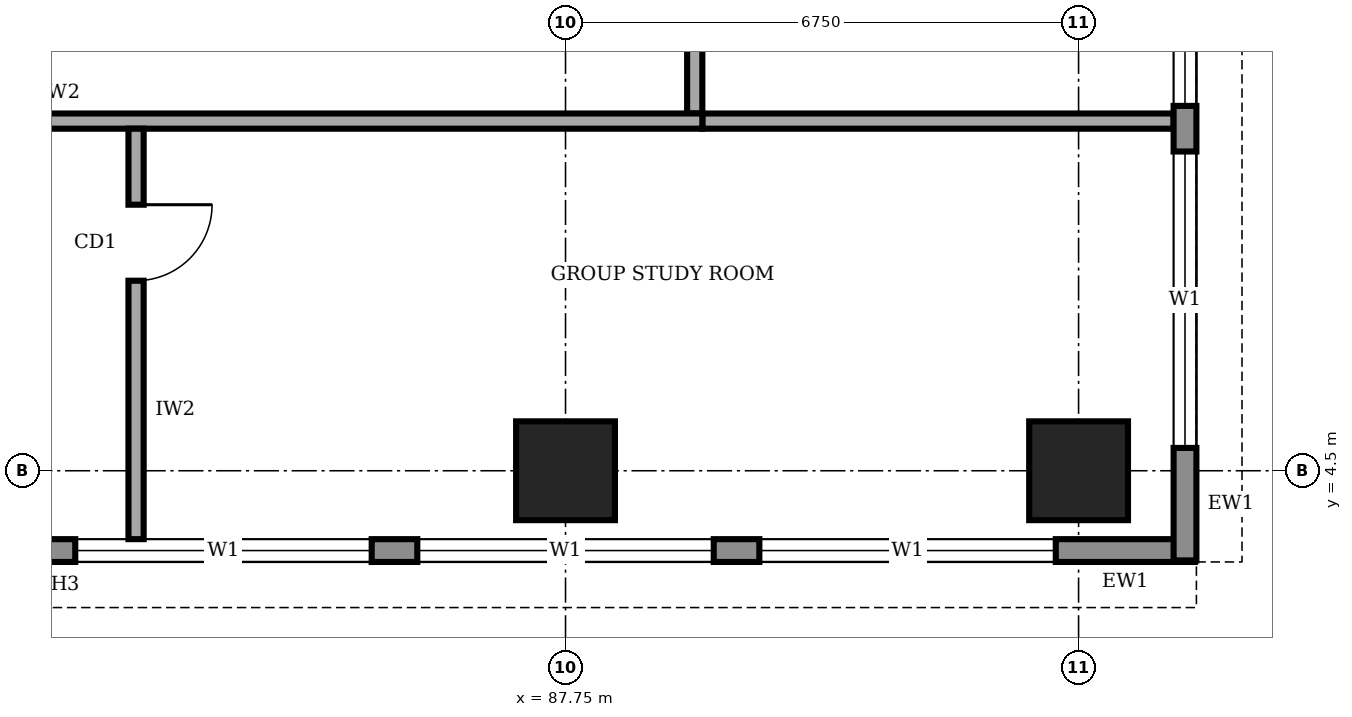
"""IFC4 building model, lengths in metres.
Left out: names, types, materials, properties, quantities, classifications, styles, units other than length and angle.
Written with IfcOpenShell. Run it as: python <this file> out.ifc"""

import sys

from ifc_helpers import new_model, si_unit, direction, frame, frame_2d, origin, origin_2d, place, context, subcontext, project, spatial, rectangle, extrude, element, fill, save


model = new_model("IFC4")
c1 = context("Model", 3, precision=1e-05, world=origin(), true_north=direction((0.0, 1.0)))
c2 = subcontext(c1, "Body", "Model", "MODEL_VIEW")
j1 = project(units=[si_unit("LENGTHUNIT", "METRE"), si_unit("PLANEANGLEUNIT", "RADIAN")], contexts=[c1])
p1 = place(None, origin())
s1 = spatial("IfcSite", under=j1, at=p1, CompositionType="ELEMENT")
p2 = place(p1, origin())
s2 = spatial("IfcBuilding", under=s1, at=p2, CompositionType="ELEMENT")
p3 = place(p2, frame((0.0, 0.0, 225.0)))
s3 = spatial("IfcBuildingStorey", under=s2, at=p3, CompositionType="ELEMENT", Elevation=225.0)
for number, where, z_axis, x_axis in (
    (1, (87.75, 4.5, 0.0), (0.0, 0.0, 1.0), (1.0, 0.0, 0.0)),
    (2, (94.5, 4.5, 0.0), (0.0, 0.0, 1.0), (1.0, 0.0, 0.0)),
):
    element("IfcColumn", number, at=place(p3, frame(where, z_axis=z_axis, x_axis=x_axis)), inside=s3, PredefinedType="COLUMN", context=c2, shape_type="SweptSolid", body=[
        extrude(rectangle(XDim=1.3, YDim=1.3, at=origin_2d()), origin(), (0.0, 0.0, 1.0), 4.0),
    ])
p4 = place(p3, frame((66.12, 3.45, 0.0), z_axis=(0.0, 0.0, 1.0), x_axis=(1.0, 0.0, 0.0)))
e3 = element("IfcWall", 3, at=p4, inside=s3, PredefinedType="STANDARD", context=c2, shape_type="SweptSolid", body=[
    extrude(rectangle(XDim=29.91, YDim=0.3, at=frame_2d((14.955, 0.0))), origin(), (0.0, 0.0, 1.0), 3.75),
])
p5 = place(p4, frame((1.68, 0.0, 0.9)))
e4 = element("IfcOpeningElement", 4, at=p5, cuts=e3, PredefinedType="OPENING", context=c2, shape_type="SweptSolid", body=[
    extrude(rectangle(XDim=3.9, YDim=2.2, at=frame_2d((1.95, 1.1))), frame((0.0, 0.16, 0.0), z_axis=(0.0, -1.0, 0.0), x_axis=(1.0, 0.0, 0.0)), (0.0, 0.0, 1.0), 0.32),
])
p6 = place(p4, frame((6.18, 0.0, 0.9)))
e5 = element("IfcOpeningElement", 5, at=p6, cuts=e3, PredefinedType="OPENING", context=c2, shape_type="SweptSolid", body=[
    extrude(rectangle(XDim=3.9, YDim=2.2, at=frame_2d((1.95, 1.1))), frame((0.0, 0.16, 0.0), z_axis=(0.0, -1.0, 0.0), x_axis=(1.0, 0.0, 0.0)), (0.0, 0.0, 1.0), 0.32),
])
p7 = place(p4, frame((10.68, 0.0, 0.9)))
e6 = element("IfcOpeningElement", 6, at=p7, cuts=e3, PredefinedType="OPENING", context=c2, shape_type="SweptSolid", body=[
    extrude(rectangle(XDim=3.9, YDim=2.2, at=frame_2d((1.95, 1.1))), frame((0.0, 0.16, 0.0), z_axis=(0.0, -1.0, 0.0), x_axis=(1.0, 0.0, 0.0)), (0.0, 0.0, 1.0), 0.32),
])
p8 = place(p4, frame((15.18, 0.0, 0.9)))
e7 = element("IfcOpeningElement", 7, at=p8, cuts=e3, PredefinedType="OPENING", context=c2, shape_type="SweptSolid", body=[
    extrude(rectangle(XDim=3.9, YDim=2.2, at=frame_2d((1.95, 1.1))), frame((0.0, 0.16, 0.0), z_axis=(0.0, -1.0, 0.0), x_axis=(1.0, 0.0, 0.0)), (0.0, 0.0, 1.0), 0.32),
])
p9 = place(p4, frame((19.68, 0.0, 0.9)))
e8 = element("IfcOpeningElement", 8, at=p9, cuts=e3, PredefinedType="OPENING", context=c2, shape_type="SweptSolid", body=[
    extrude(rectangle(XDim=3.9, YDim=2.2, at=frame_2d((1.95, 1.1))), frame((0.0, 0.16, 0.0), z_axis=(0.0, -1.0, 0.0), x_axis=(1.0, 0.0, 0.0)), (0.0, 0.0, 1.0), 0.32),
])
p10 = place(p4, frame((24.18, 0.0, 0.9)))
e9 = element("IfcOpeningElement", 9, at=p10, cuts=e3, PredefinedType="OPENING", context=c2, shape_type="SweptSolid", body=[
    extrude(rectangle(XDim=3.9, YDim=2.2, at=frame_2d((1.95, 1.1))), frame((0.0, 0.16, 0.0), z_axis=(0.0, -1.0, 0.0), x_axis=(1.0, 0.0, 0.0)), (0.0, 0.0, 1.0), 0.32),
])
p11 = place(p3, frame((95.9, 3.32, 0.0), z_axis=(0.0, 0.0, 1.0), x_axis=(0.0, 1.0, 0.0)))
e10 = element("IfcWall", 10, at=p11, inside=s3, PredefinedType="STANDARD", context=c2, shape_type="SweptSolid", body=[
    extrude(rectangle(XDim=33.86, YDim=0.3, at=frame_2d((16.93, 0.0))), origin(), (0.0, 0.0, 1.0), 3.75),
])
p12 = place(p11, frame((1.48, 0.0, 0.9)))
e11 = element("IfcOpeningElement", 11, at=p12, cuts=e10, PredefinedType="OPENING", context=c2, shape_type="SweptSolid", body=[
    extrude(rectangle(XDim=3.9, YDim=2.2, at=frame_2d((1.95, 1.1))), frame((0.0, 0.16, 0.0), z_axis=(0.0, -1.0, 0.0), x_axis=(1.0, 0.0, 0.0)), (0.0, 0.0, 1.0), 0.32),
])
p13 = place(p11, frame((5.98, 0.0, 0.9)))
e12 = element("IfcOpeningElement", 12, at=p13, cuts=e10, PredefinedType="OPENING", context=c2, shape_type="SweptSolid", body=[
    extrude(rectangle(XDim=3.9, YDim=2.2, at=frame_2d((1.95, 1.1))), frame((0.0, 0.16, 0.0), z_axis=(0.0, -1.0, 0.0), x_axis=(1.0, 0.0, 0.0)), (0.0, 0.0, 1.0), 0.32),
])
p14 = place(p11, frame((10.48, 0.0, 0.9)))
e13 = element("IfcOpeningElement", 13, at=p14, cuts=e10, PredefinedType="OPENING", context=c2, shape_type="SweptSolid", body=[
    extrude(rectangle(XDim=3.9, YDim=2.2, at=frame_2d((1.95, 1.1))), frame((0.0, 0.16, 0.0), z_axis=(0.0, -1.0, 0.0), x_axis=(1.0, 0.0, 0.0)), (0.0, 0.0, 1.0), 0.32),
])
p15 = place(p11, frame((14.98, 0.0, 0.9)))
e14 = element("IfcOpeningElement", 14, at=p15, cuts=e10, PredefinedType="OPENING", context=c2, shape_type="SweptSolid", body=[
    extrude(rectangle(XDim=3.9, YDim=2.2, at=frame_2d((1.95, 1.1))), frame((0.0, 0.16, 0.0), z_axis=(0.0, -1.0, 0.0), x_axis=(1.0, 0.0, 0.0)), (0.0, 0.0, 1.0), 0.32),
])
p16 = place(p11, frame((19.48, 0.0, 0.9)))
e15 = element("IfcOpeningElement", 15, at=p16, cuts=e10, PredefinedType="OPENING", context=c2, shape_type="SweptSolid", body=[
    extrude(rectangle(XDim=3.9, YDim=2.2, at=frame_2d((1.95, 1.1))), frame((0.0, 0.16, 0.0), z_axis=(0.0, -1.0, 0.0), x_axis=(1.0, 0.0, 0.0)), (0.0, 0.0, 1.0), 0.32),
])
p17 = place(p11, frame((23.98, 0.0, 0.9)))
e16 = element("IfcOpeningElement", 16, at=p17, cuts=e10, PredefinedType="OPENING", context=c2, shape_type="SweptSolid", body=[
    extrude(rectangle(XDim=3.9, YDim=2.2, at=frame_2d((1.95, 1.1))), frame((0.0, 0.16, 0.0), z_axis=(0.0, -1.0, 0.0), x_axis=(1.0, 0.0, 0.0)), (0.0, 0.0, 1.0), 0.32),
])
p18 = place(p11, frame((28.48, 0.0, 0.9)))
e17 = element("IfcOpeningElement", 17, at=p18, cuts=e10, PredefinedType="OPENING", context=c2, shape_type="SweptSolid", body=[
    extrude(rectangle(XDim=3.9, YDim=2.2, at=frame_2d((1.95, 1.1))), frame((0.0, 0.16, 0.0), z_axis=(0.0, -1.0, 0.0), x_axis=(1.0, 0.0, 0.0)), (0.0, 0.0, 1.0), 0.32),
])
p19 = place(p3, frame((72.65, 9.1, 0.0), z_axis=(0.0, 0.0, 1.0), x_axis=(1.0, 0.0, 0.0)))
e18 = element("IfcWall", 18, at=p19, inside=s3, PredefinedType="SOLIDWALL", context=c2, shape_type="SweptSolid", body=[
    extrude(rectangle(XDim=16.9, YDim=0.2, at=frame_2d((8.45, 0.0))), origin(), (0.0, 0.0, 1.0), 3.75),
])
p20 = place(p3, frame((89.45, 9.2, 0.0), z_axis=(0.0, 0.0, 1.0), x_axis=(0.0, 1.0, 0.0)))
e19 = element("IfcWall", 19, at=p20, inside=s3, PredefinedType="SOLIDWALL", context=c2, shape_type="SweptSolid", body=[
    extrude(rectangle(XDim=23.8, YDim=0.2, at=frame_2d((11.9, 0.0))), origin(), (0.0, 0.0, 1.0), 3.75),
])
p21 = place(p20, frame((1.55, 0.0, 0.0)))
e20 = element("IfcOpeningElement", 20, at=p21, cuts=e19, PredefinedType="OPENING", context=c2, shape_type="SweptSolid", body=[
    extrude(rectangle(XDim=1.0, YDim=2.1, at=frame_2d((0.5, 1.05))), frame((0.0, 0.11, 0.0), z_axis=(0.0, -1.0, 0.0), x_axis=(1.0, 0.0, 0.0)), (0.0, 0.0, 1.0), 0.22),
])
p22 = place(p20, frame((5.75, 0.0, 0.0)))
e21 = element("IfcOpeningElement", 21, at=p22, cuts=e19, PredefinedType="OPENING", context=c2, shape_type="SweptSolid", body=[
    extrude(rectangle(XDim=0.9, YDim=2.1, at=frame_2d((0.45, 1.05))), frame((0.0, 0.11, 0.0), z_axis=(0.0, -1.0, 0.0), x_axis=(1.0, 0.0, 0.0)), (0.0, 0.0, 1.0), 0.22),
])
p23 = place(p20, frame((8.75, 0.0, 0.0)))
e22 = element("IfcOpeningElement", 22, at=p23, cuts=e19, PredefinedType="OPENING", context=c2, shape_type="SweptSolid", body=[
    extrude(rectangle(XDim=0.9, YDim=2.1, at=frame_2d((0.45, 1.05))), frame((0.0, 0.11, 0.0), z_axis=(0.0, -1.0, 0.0), x_axis=(1.0, 0.0, 0.0)), (0.0, 0.0, 1.0), 0.22),
])
p24 = place(p20, frame((13.6, 0.0, 0.0)))
e23 = element("IfcOpeningElement", 23, at=p24, cuts=e19, PredefinedType="OPENING", context=c2, shape_type="SweptSolid", body=[
    extrude(rectangle(XDim=0.9, YDim=2.1, at=frame_2d((0.45, 1.05))), frame((0.0, 0.11, 0.0), z_axis=(0.0, -1.0, 0.0), x_axis=(1.0, 0.0, 0.0)), (0.0, 0.0, 1.0), 0.22),
])
p25 = place(p20, frame((16.3, 0.0, 0.0)))
e24 = element("IfcOpeningElement", 24, at=p25, cuts=e19, PredefinedType="OPENING", context=c2, shape_type="SweptSolid", body=[
    extrude(rectangle(XDim=1.0, YDim=2.1, at=frame_2d((0.5, 1.05))), frame((0.0, 0.11, 0.0), z_axis=(0.0, -1.0, 0.0), x_axis=(1.0, 0.0, 0.0)), (0.0, 0.0, 1.0), 0.22),
])
p26 = place(p20, frame((10.8, 0.0, 0.0)))
e25 = element("IfcOpeningElement", 25, at=p26, cuts=e19, PredefinedType="OPENING", context=c2, shape_type="SweptSolid", body=[
    extrude(rectangle(XDim=1.0, YDim=2.1, at=frame_2d((0.5, 1.05))), frame((0.0, 0.11, 0.0), z_axis=(0.0, -1.0, 0.0), x_axis=(1.0, 0.0, 0.0)), (0.0, 0.0, 1.0), 0.22),
])
p27 = place(p20, frame((20.3, 0.0, 0.0)))
e26 = element("IfcOpeningElement", 26, at=p27, cuts=e19, PredefinedType="OPENING", context=c2, shape_type="SweptSolid", body=[
    extrude(rectangle(XDim=1.0, YDim=2.1, at=frame_2d((0.5, 1.05))), frame((0.0, 0.11, 0.0), z_axis=(0.0, -1.0, 0.0), x_axis=(1.0, 0.0, 0.0)), (0.0, 0.0, 1.0), 0.22),
])
p28 = place(p3, frame((82.1, 9.0, 0.0), z_axis=(0.0, 0.0, 1.0), x_axis=(0.0, -1.0, 0.0)))
e27 = element("IfcWall", 27, at=p28, inside=s3, PredefinedType="SOLIDWALL", context=c2, shape_type="SweptSolid", body=[
    extrude(rectangle(XDim=5.4, YDim=0.2, at=frame_2d((2.7, 0.0))), origin(), (0.0, 0.0, 1.0), 3.75),
])
p29 = place(p28, frame((1.0, 0.0, 0.0)))
e28 = element("IfcOpeningElement", 28, at=p29, cuts=e27, PredefinedType="OPENING", context=c2, shape_type="SweptSolid", body=[
    extrude(rectangle(XDim=1.0, YDim=2.1, at=frame_2d((0.5, 1.05))), frame((0.0, 0.11, 0.0), z_axis=(0.0, -1.0, 0.0), x_axis=(1.0, 0.0, 0.0)), (0.0, 0.0, 1.0), 0.22),
])
p30 = place(p3, frame((89.55, 9.1, 0.0), z_axis=(0.0, 0.0, 1.0), x_axis=(1.0, 0.0, 0.0)))
e29 = element("IfcWall", 29, at=p30, inside=s3, PredefinedType="SOLIDWALL", context=c2, shape_type="SweptSolid", body=[
    extrude(rectangle(XDim=6.2, YDim=0.2, at=frame_2d((3.1, 0.0))), origin(), (0.0, 0.0, 1.0), 3.75),
])
p31 = place(p8, origin())
e30 = element("IfcWindow", 30, at=p31, inside=s3, PartitioningType="SINGLE_PANEL", PredefinedType="WINDOW", context=c2, shape_type="SweptSolid", body=[
    extrude(rectangle(XDim=3.9, YDim=2.2, at=frame_2d((1.95, 1.1))), frame((0.0, 0.03, 0.0), z_axis=(0.0, -1.0, 0.0), x_axis=(1.0, 0.0, 0.0)), (0.0, 0.0, 1.0), 0.06),
])
fill(e7, e30)
p32 = place(p9, origin())
e31 = element("IfcWindow", 31, at=p32, inside=s3, PartitioningType="SINGLE_PANEL", PredefinedType="WINDOW", context=c2, shape_type="SweptSolid", body=[
    extrude(rectangle(XDim=3.9, YDim=2.2, at=frame_2d((1.95, 1.1))), frame((0.0, 0.03, 0.0), z_axis=(0.0, -1.0, 0.0), x_axis=(1.0, 0.0, 0.0)), (0.0, 0.0, 1.0), 0.06),
])
fill(e8, e31)
p33 = place(p10, origin())
e32 = element("IfcWindow", 32, at=p33, inside=s3, PartitioningType="SINGLE_PANEL", PredefinedType="WINDOW", context=c2, shape_type="SweptSolid", body=[
    extrude(rectangle(XDim=3.9, YDim=2.2, at=frame_2d((1.95, 1.1))), frame((0.0, 0.03, 0.0), z_axis=(0.0, -1.0, 0.0), x_axis=(1.0, 0.0, 0.0)), (0.0, 0.0, 1.0), 0.06),
])
fill(e9, e32)
p34 = place(p12, origin())
e33 = element("IfcWindow", 33, at=p34, inside=s3, PartitioningType="SINGLE_PANEL", PredefinedType="WINDOW", context=c2, shape_type="SweptSolid", body=[
    extrude(rectangle(XDim=3.9, YDim=2.2, at=frame_2d((1.95, 1.1))), frame((0.0, 0.03, 0.0), z_axis=(0.0, -1.0, 0.0), x_axis=(1.0, 0.0, 0.0)), (0.0, 0.0, 1.0), 0.06),
])
fill(e11, e33)
p35 = place(p13, origin())
e34 = element("IfcWindow", 34, at=p35, inside=s3, PartitioningType="SINGLE_PANEL", PredefinedType="WINDOW", context=c2, shape_type="SweptSolid", body=[
    extrude(rectangle(XDim=3.9, YDim=2.2, at=frame_2d((1.95, 1.1))), frame((0.0, 0.03, 0.0), z_axis=(0.0, -1.0, 0.0), x_axis=(1.0, 0.0, 0.0)), (0.0, 0.0, 1.0), 0.06),
])
fill(e12, e34)
p36 = place(p29, origin())
e35 = element("IfcDoor", 35, at=p36, inside=s3, OperationType="SINGLE_SWING_LEFT", PredefinedType="DOOR", context=c2, shape_type="SweptSolid", body=[
    extrude(rectangle(XDim=1.0, YDim=2.1, at=frame_2d((0.5, 1.05))), frame((0.0, 0.025, 0.0), z_axis=(0.0, -1.0, 0.0), x_axis=(1.0, 0.0, 0.0)), (0.0, 0.0, 1.0), 0.05),
])
fill(e28, e35)
save(model, sys.argv[1])
